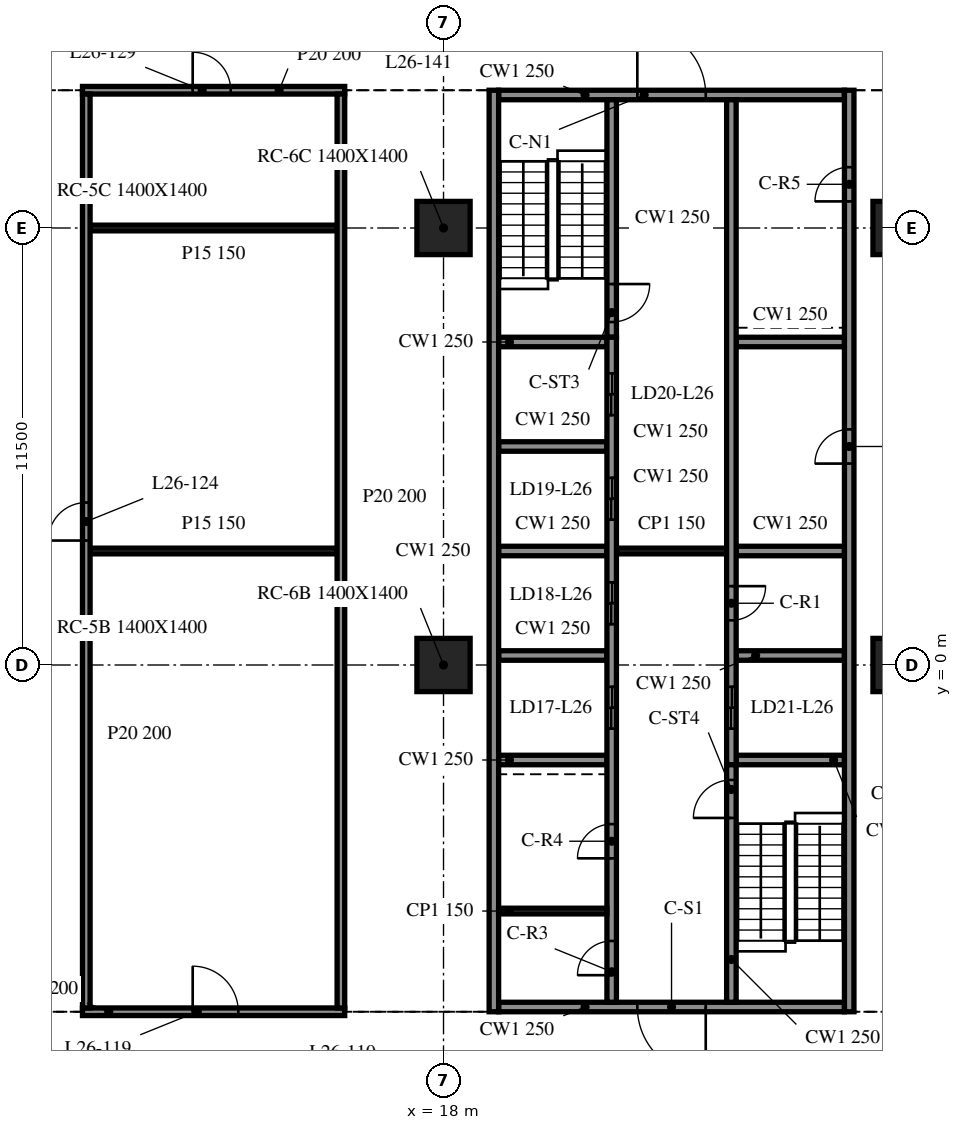
"""IFC4 building model, lengths in metres.
Left out: names, types, materials, properties, quantities, classifications, styles, units other than length and angle.
Written with IfcOpenShell. Run it as: python <this file> out.ifc"""

import sys

from ifc_helpers import new_model, si_unit, direction, frame, frame_2d, origin, origin_2d, place, context, subcontext, project, spatial, rectangle, extrude, element, fill, save


model = new_model("IFC4")
c1 = context("Model", 3, precision=1e-05, world=origin(), true_north=direction((0.0, 1.0)))
c2 = subcontext(c1, "Body", "Model", "MODEL_VIEW")
j1 = project(units=[si_unit("LENGTHUNIT", "METRE"), si_unit("PLANEANGLEUNIT", "RADIAN")], contexts=[c1])
p1 = place(None, origin())
s1 = spatial("IfcSite", under=j1, at=p1, CompositionType="ELEMENT")
p2 = place(p1, origin())
s2 = spatial("IfcBuilding", under=s1, at=p2, CompositionType="ELEMENT")
p3 = place(p2, frame((0.0, 0.0, 113.5)))
s3 = spatial("IfcBuildingStorey", under=s2, at=p3, CompositionType="ELEMENT", Elevation=113.5)
for number, where, z_axis, x_axis in (
    (1, (18.0, 0.0, -0.34), (0.0, 0.0, 1.0), (1.0, 0.0, 0.0)),
    (2, (18.0, 11.5, -0.34), (0.0, 0.0, 1.0), (1.0, 0.0, 0.0)),
    (3, (30.0, 0.0, -0.34), (0.0, 0.0, 1.0), (1.0, 0.0, 0.0)),
    (4, (30.0, 11.5, -0.34), (0.0, 0.0, 1.0), (1.0, 0.0, 0.0)),
):
    element("IfcColumn", number, at=place(p3, frame(where, z_axis=z_axis, x_axis=x_axis)), inside=s3, PredefinedType="COLUMN", context=c2, shape_type="SweptSolid", body=[
        extrude(rectangle(XDim=1.4, YDim=1.4, at=origin_2d()), origin(), (0.0, 0.0, 1.0), 3.89),
    ])
p4 = place(p3, frame((19.325, 15.125, 0.0), z_axis=(0.0, 0.0, 1.0), x_axis=(0.0, -1.0, 0.0)))
e5 = element("IfcWall", 5, at=p4, inside=s3, PredefinedType="SOLIDWALL", context=c2, shape_type="SweptSolid", body=[
    extrude(rectangle(XDim=24.25, YDim=0.25, at=frame_2d((12.125, 0.0))), origin(), (0.0, 0.0, 1.0), 3.55),
])
p5 = place(p3, frame((28.675, -9.125, 0.0), z_axis=(0.0, 0.0, 1.0), x_axis=(0.0, 1.0, 0.0)))
e6 = element("IfcWall", 6, at=p5, inside=s3, PredefinedType="SOLIDWALL", context=c2, shape_type="SweptSolid", body=[
    extrude(rectangle(XDim=24.25, YDim=0.25, at=frame_2d((12.125, 0.0))), origin(), (0.0, 0.0, 1.0), 3.55),
])
p6 = place(p5, frame((14.425, 0.0, 0.0)))
e7 = element("IfcOpeningElement", 7, at=p6, cuts=e6, PredefinedType="OPENING", context=c2, shape_type="SweptSolid", body=[
    extrude(rectangle(XDim=0.9, YDim=2.1, at=frame_2d((0.45, 1.05))), frame((0.0, 0.135, 0.0), z_axis=(0.0, -1.0, 0.0), x_axis=(1.0, 0.0, 0.0)), (0.0, 0.0, 1.0), 0.27),
])
p7 = place(p5, frame((21.325, 0.0, 0.0)))
e8 = element("IfcOpeningElement", 8, at=p7, cuts=e6, PredefinedType="OPENING", context=c2, shape_type="SweptSolid", body=[
    extrude(rectangle(XDim=0.9, YDim=2.1, at=frame_2d((0.45, 1.05))), frame((0.0, 0.135, 0.0), z_axis=(0.0, -1.0, 0.0), x_axis=(1.0, 0.0, 0.0)), (0.0, 0.0, 1.0), 0.27),
])
p8 = place(p3, frame((28.55, -9.0, 0.0), z_axis=(0.0, 0.0, 1.0), x_axis=(-1.0, 0.0, 0.0)))
e9 = element("IfcWall", 9, at=p8, inside=s3, PredefinedType="SOLIDWALL", context=c2, shape_type="SweptSolid", body=[
    extrude(rectangle(XDim=9.1, YDim=0.25, at=frame_2d((4.55, 0.0))), origin(), (0.0, 0.0, 1.0), 3.55),
])
p9 = place(p8, frame((3.65, 0.0, 0.0)))
e10 = element("IfcOpeningElement", 10, at=p9, cuts=e9, PredefinedType="OPENING", context=c2, shape_type="SweptSolid", body=[
    extrude(rectangle(XDim=1.8, YDim=2.1, at=frame_2d((0.9, 1.05))), frame((0.0, 0.135, 0.0), z_axis=(0.0, -1.0, 0.0), x_axis=(1.0, 0.0, 0.0)), (0.0, 0.0, 1.0), 0.27),
])
p10 = place(p3, frame((19.45, 15.0, 0.0), z_axis=(0.0, 0.0, 1.0), x_axis=(1.0, 0.0, 0.0)))
e11 = element("IfcWall", 11, at=p10, inside=s3, PredefinedType="SOLIDWALL", context=c2, shape_type="SweptSolid", body=[
    extrude(rectangle(XDim=9.1, YDim=0.25, at=frame_2d((4.55, 0.0))), origin(), (0.0, 0.0, 1.0), 3.55),
])
p11 = place(p10, frame((3.65, 0.0, 0.0)))
e12 = element("IfcOpeningElement", 12, at=p11, cuts=e11, PredefinedType="OPENING", context=c2, shape_type="SweptSolid", body=[
    extrude(rectangle(XDim=1.8, YDim=2.1, at=frame_2d((0.9, 1.05))), frame((0.0, 0.135, 0.0), z_axis=(0.0, -1.0, 0.0), x_axis=(1.0, 0.0, 0.0)), (0.0, 0.0, 1.0), 0.27),
])
p12 = place(p3, frame((22.425, -8.875, 0.0), z_axis=(0.0, 0.0, 1.0), x_axis=(0.0, 1.0, 0.0)))
e13 = element("IfcWall", 13, at=p12, inside=s3, PredefinedType="SOLIDWALL", context=c2, shape_type="SweptSolid", body=[
    extrude(rectangle(XDim=17.5, YDim=0.25, at=frame_2d((8.75, 0.0))), origin(), (0.0, 0.0, 1.0), 3.55),
])
p13 = place(p12, frame((7.2, 0.0, 0.0)))
e14 = element("IfcOpeningElement", 14, at=p13, cuts=e13, PredefinedType="OPENING", context=c2, shape_type="SweptSolid", body=[
    extrude(rectangle(XDim=1.1, YDim=2.1, at=frame_2d((0.55, 1.05))), frame((0.0, 0.135, 0.0), z_axis=(0.0, -1.0, 0.0), x_axis=(1.0, 0.0, 0.0)), (0.0, 0.0, 1.0), 0.27),
])
p14 = place(p12, frame((9.95, 0.0, 0.0)))
e15 = element("IfcOpeningElement", 15, at=p14, cuts=e13, PredefinedType="OPENING", context=c2, shape_type="SweptSolid", body=[
    extrude(rectangle(XDim=1.1, YDim=2.1, at=frame_2d((0.55, 1.05))), frame((0.0, 0.135, 0.0), z_axis=(0.0, -1.0, 0.0), x_axis=(1.0, 0.0, 0.0)), (0.0, 0.0, 1.0), 0.27),
])
p15 = place(p12, frame((12.7, 0.0, 0.0)))
e16 = element("IfcOpeningElement", 16, at=p15, cuts=e13, PredefinedType="OPENING", context=c2, shape_type="SweptSolid", body=[
    extrude(rectangle(XDim=1.1, YDim=2.1, at=frame_2d((0.55, 1.05))), frame((0.0, 0.135, 0.0), z_axis=(0.0, -1.0, 0.0), x_axis=(1.0, 0.0, 0.0)), (0.0, 0.0, 1.0), 0.27),
])
p16 = place(p12, frame((15.45, 0.0, 0.0)))
e17 = element("IfcOpeningElement", 17, at=p16, cuts=e13, PredefinedType="OPENING", context=c2, shape_type="SweptSolid", body=[
    extrude(rectangle(XDim=1.1, YDim=2.1, at=frame_2d((0.55, 1.05))), frame((0.0, 0.135, 0.0), z_axis=(0.0, -1.0, 0.0), x_axis=(1.0, 0.0, 0.0)), (0.0, 0.0, 1.0), 0.27),
])
p17 = place(p12, frame((0.712, 0.0, 0.0)))
e18 = element("IfcOpeningElement", 18, at=p17, cuts=e13, PredefinedType="OPENING", context=c2, shape_type="SweptSolid", body=[
    extrude(rectangle(XDim=0.9, YDim=2.1, at=frame_2d((0.45, 1.05))), frame((0.0, 0.135, 0.0), z_axis=(0.0, -1.0, 0.0), x_axis=(1.0, 0.0, 0.0)), (0.0, 0.0, 1.0), 0.27),
])
p18 = place(p12, frame((3.788, 0.0, 0.0)))
e19 = element("IfcOpeningElement", 19, at=p18, cuts=e13, PredefinedType="OPENING", context=c2, shape_type="SweptSolid", body=[
    extrude(rectangle(XDim=0.9, YDim=2.1, at=frame_2d((0.45, 1.05))), frame((0.0, 0.135, 0.0), z_axis=(0.0, -1.0, 0.0), x_axis=(1.0, 0.0, 0.0)), (0.0, 0.0, 1.0), 0.27),
])
p19 = place(p3, frame((22.425, 14.875, 0.0), z_axis=(0.0, 0.0, 1.0), x_axis=(0.0, -1.0, 0.0)))
e20 = element("IfcWall", 20, at=p19, inside=s3, PredefinedType="SOLIDWALL", context=c2, shape_type="SweptSolid", body=[
    extrude(rectangle(XDim=6.25, YDim=0.25, at=frame_2d((3.125, 0.0))), origin(), (0.0, 0.0, 1.0), 3.55),
])
p20 = place(p19, frame((4.85, 0.0, 0.0)))
e21 = element("IfcOpeningElement", 21, at=p20, cuts=e20, PredefinedType="OPENING", context=c2, shape_type="SweptSolid", body=[
    extrude(rectangle(XDim=1.0, YDim=2.1, at=frame_2d((0.5, 1.05))), frame((0.0, 0.135, 0.0), z_axis=(0.0, -1.0, 0.0), x_axis=(1.0, 0.0, 0.0)), (0.0, 0.0, 1.0), 0.27),
])
p21 = place(p3, frame((25.575, -8.875, 0.0), z_axis=(0.0, 0.0, 1.0), x_axis=(0.0, 1.0, 0.0)))
e22 = element("IfcWall", 22, at=p21, inside=s3, PredefinedType="SOLIDWALL", context=c2, shape_type="SweptSolid", body=[
    extrude(rectangle(XDim=6.25, YDim=0.25, at=frame_2d((3.125, 0.0))), origin(), (0.0, 0.0, 1.0), 3.55),
])
p22 = place(p21, frame((4.85, 0.0, 0.0)))
e23 = element("IfcOpeningElement", 23, at=p22, cuts=e22, PredefinedType="OPENING", context=c2, shape_type="SweptSolid", body=[
    extrude(rectangle(XDim=1.0, YDim=2.1, at=frame_2d((0.5, 1.05))), frame((0.0, 0.135, 0.0), z_axis=(0.0, -1.0, 0.0), x_axis=(1.0, 0.0, 0.0)), (0.0, 0.0, 1.0), 0.27),
])
p23 = place(p3, frame((25.575, 14.875, 0.0), z_axis=(0.0, 0.0, 1.0), x_axis=(0.0, -1.0, 0.0)))
e24 = element("IfcWall", 24, at=p23, inside=s3, PredefinedType="SOLIDWALL", context=c2, shape_type="SweptSolid", body=[
    extrude(rectangle(XDim=17.5, YDim=0.25, at=frame_2d((8.75, 0.0))), origin(), (0.0, 0.0, 1.0), 3.55),
])
p24 = place(p23, frame((15.45, 0.0, 0.0)))
e25 = element("IfcOpeningElement", 25, at=p24, cuts=e24, PredefinedType="OPENING", context=c2, shape_type="SweptSolid", body=[
    extrude(rectangle(XDim=1.1, YDim=2.1, at=frame_2d((0.55, 1.05))), frame((0.0, 0.135, 0.0), z_axis=(0.0, -1.0, 0.0), x_axis=(1.0, 0.0, 0.0)), (0.0, 0.0, 1.0), 0.27),
])
p25 = place(p23, frame((12.8, 0.0, 0.0)))
e26 = element("IfcOpeningElement", 26, at=p25, cuts=e24, PredefinedType="OPENING", context=c2, shape_type="SweptSolid", body=[
    extrude(rectangle(XDim=0.9, YDim=2.1, at=frame_2d((0.45, 1.05))), frame((0.0, 0.135, 0.0), z_axis=(0.0, -1.0, 0.0), x_axis=(1.0, 0.0, 0.0)), (0.0, 0.0, 1.0), 0.27),
])
for number, where, z_axis, x_axis in (
    (27, (19.45, -2.5, 0.0), (0.0, 0.0, 1.0), (1.0, 0.0, 0.0)),
    (28, (19.45, 0.25, 0.0), (0.0, 0.0, 1.0), (1.0, 0.0, 0.0)),
    (29, (19.45, 3.0, 0.0), (0.0, 0.0, 1.0), (1.0, 0.0, 0.0)),
    (30, (19.45, 5.75, 0.0), (0.0, 0.0, 1.0), (1.0, 0.0, 0.0)),
    (31, (19.45, 8.5, 0.0), (0.0, 0.0, 1.0), (1.0, 0.0, 0.0)),
    (32, (25.7, -2.5, 0.0), (0.0, 0.0, 1.0), (1.0, 0.0, 0.0)),
    (33, (25.7, 0.25, 0.0), (0.0, 0.0, 1.0), (1.0, 0.0, 0.0)),
    (34, (25.7, 3.0, 0.0), (0.0, 0.0, 1.0), (1.0, 0.0, 0.0)),
    (35, (25.7, 8.5, 0.0), (0.0, 0.0, 1.0), (1.0, 0.0, 0.0)),
):
    element("IfcWall", number, at=place(p3, frame(where, z_axis=z_axis, x_axis=x_axis)), inside=s3, PredefinedType="SOLIDWALL", context=c2, shape_type="SweptSolid", body=[
        extrude(rectangle(XDim=2.85, YDim=0.25, at=frame_2d((1.425, 0.0))), origin(), (0.0, 0.0, 1.0), 3.55),
    ])
p26 = place(p3, frame((22.55, 3.0, 0.0), z_axis=(0.0, 0.0, 1.0), x_axis=(1.0, 0.0, 0.0)))
e36 = element("IfcWall", 36, at=p26, inside=s3, PredefinedType="PARTITIONING", context=c2, shape_type="SweptSolid", body=[
    extrude(rectangle(XDim=2.9, YDim=0.15, at=frame_2d((1.45, 0.0))), origin(), (0.0, 0.0, 1.0), 3.55),
])
p27 = place(p3, frame((19.45, -6.475, 0.0), z_axis=(0.0, 0.0, 1.0), x_axis=(1.0, 0.0, 0.0)))
e37 = element("IfcWall", 37, at=p27, inside=s3, PredefinedType="PARTITIONING", context=c2, shape_type="SweptSolid", body=[
    extrude(rectangle(XDim=2.85, YDim=0.15, at=frame_2d((1.425, 0.0))), origin(), (0.0, 0.0, 1.0), 3.55),
])
p28 = place(p3, frame((8.5, -9.125, 0.0), z_axis=(0.0, 0.0, 1.0), x_axis=(1.0, 0.0, 0.0)))
e38 = element("IfcWall", 38, at=p28, inside=s3, PredefinedType="PARTITIONING", context=c2, shape_type="SweptSolid", body=[
    extrude(rectangle(XDim=6.9, YDim=0.2, at=frame_2d((3.45, 0.0))), origin(), (0.0, 0.0, 1.0), 3.55),
])
p29 = place(p28, frame((2.9, 0.0, 0.0)))
e39 = element("IfcOpeningElement", 39, at=p29, cuts=e38, PredefinedType="OPENING", context=c2, shape_type="SweptSolid", body=[
    extrude(rectangle(XDim=1.2, YDim=2.1, at=frame_2d((0.6, 1.05))), frame((0.0, 0.11, 0.0), z_axis=(0.0, -1.0, 0.0), x_axis=(1.0, 0.0, 0.0)), (0.0, 0.0, 1.0), 0.22),
])
for number, where, z_axis, x_axis in (
    (40, (8.7, 3.0, 0.0), (0.0, 0.0, 1.0), (1.0, 0.0, 0.0)),
    (41, (8.7, 11.5, 0.0), (0.0, 0.0, 1.0), (1.0, 0.0, 0.0)),
):
    element("IfcWall", number, at=place(p3, frame(where, z_axis=z_axis, x_axis=x_axis)), inside=s3, PredefinedType="PARTITIONING", context=c2, shape_type="SweptSolid", body=[
        extrude(rectangle(XDim=6.5, YDim=0.15, at=frame_2d((3.25, 0.0))), origin(), (0.0, 0.0, 1.0), 3.55),
    ])
p30 = place(p3, frame((8.5, 15.125, 0.0), z_axis=(0.0, 0.0, 1.0), x_axis=(1.0, 0.0, 0.0)))
e42 = element("IfcWall", 42, at=p30, inside=s3, PredefinedType="PARTITIONING", context=c2, shape_type="SweptSolid", body=[
    extrude(rectangle(XDim=6.9, YDim=0.2, at=frame_2d((3.45, 0.0))), origin(), (0.0, 0.0, 1.0), 3.55),
])
p31 = place(p30, frame((2.9, 0.0, 0.0)))
e43 = element("IfcOpeningElement", 43, at=p31, cuts=e42, PredefinedType="OPENING", context=c2, shape_type="SweptSolid", body=[
    extrude(rectangle(XDim=1.0, YDim=2.1, at=frame_2d((0.5, 1.05))), frame((0.0, 0.11, 0.0), z_axis=(0.0, -1.0, 0.0), x_axis=(1.0, 0.0, 0.0)), (0.0, 0.0, 1.0), 0.22),
])
p32 = place(p3, frame((8.6, -9.025, 0.0), z_axis=(0.0, 0.0, 1.0), x_axis=(0.0, 1.0, 0.0)))
e44 = element("IfcWall", 44, at=p32, inside=s3, PredefinedType="PARTITIONING", context=c2, shape_type="SweptSolid", body=[
    extrude(rectangle(XDim=24.05, YDim=0.2, at=frame_2d((12.025, 0.0))), origin(), (0.0, 0.0, 1.0), 3.55),
])
p33 = place(p32, frame((12.3, 0.0, 0.0)))
e45 = element("IfcOpeningElement", 45, at=p33, cuts=e44, PredefinedType="OPENING", context=c2, shape_type="SweptSolid", body=[
    extrude(rectangle(XDim=1.0, YDim=2.1, at=frame_2d((0.5, 1.05))), frame((0.0, 0.11, 0.0), z_axis=(0.0, -1.0, 0.0), x_axis=(1.0, 0.0, 0.0)), (0.0, 0.0, 1.0), 0.22),
])
p34 = place(p3, frame((15.3, -9.025, 0.0), z_axis=(0.0, 0.0, 1.0), x_axis=(0.0, 1.0, 0.0)))
e46 = element("IfcWall", 46, at=p34, inside=s3, PredefinedType="PARTITIONING", context=c2, shape_type="SweptSolid", body=[
    extrude(rectangle(XDim=24.05, YDim=0.2, at=frame_2d((12.025, 0.0))), origin(), (0.0, 0.0, 1.0), 3.55),
])
p35 = place(p9, origin())
e47 = element("IfcDoor", 47, at=p35, inside=s3, OperationType="DOUBLE_DOOR_SINGLE_SWING", PredefinedType="DOOR", context=c2, shape_type="SweptSolid", body=[
    extrude(rectangle(XDim=1.8, YDim=2.1, at=frame_2d((0.9, 1.05))), frame((0.0, 0.025, 0.0), z_axis=(0.0, -1.0, 0.0), x_axis=(1.0, 0.0, 0.0)), (0.0, 0.0, 1.0), 0.05),
])
fill(e10, e47)
p36 = place(p11, origin())
e48 = element("IfcDoor", 48, at=p36, inside=s3, OperationType="DOUBLE_DOOR_SINGLE_SWING", PredefinedType="DOOR", context=c2, shape_type="SweptSolid", body=[
    extrude(rectangle(XDim=1.8, YDim=2.1, at=frame_2d((0.9, 1.05))), frame((0.0, 0.025, 0.0), z_axis=(0.0, -1.0, 0.0), x_axis=(1.0, 0.0, 0.0)), (0.0, 0.0, 1.0), 0.05),
])
fill(e12, e48)
p37 = place(p24, origin())
e49 = element("IfcDoor", 49, at=p37, inside=s3, OperationType="DOUBLE_DOOR_SLIDING", PredefinedType="DOOR", context=c2, shape_type="SweptSolid", body=[
    extrude(rectangle(XDim=1.1, YDim=2.1, at=frame_2d((0.55, 1.05))), frame((0.0, 0.025, 0.0), z_axis=(0.0, -1.0, 0.0), x_axis=(1.0, 0.0, 0.0)), (0.0, 0.0, 1.0), 0.05),
])
fill(e25, e49)
p38 = place(p13, origin())
e50 = element("IfcDoor", 50, at=p38, inside=s3, OperationType="DOUBLE_DOOR_SLIDING", PredefinedType="DOOR", context=c2, shape_type="SweptSolid", body=[
    extrude(rectangle(XDim=1.1, YDim=2.1, at=frame_2d((0.55, 1.05))), frame((0.0, 0.025, 0.0), z_axis=(0.0, -1.0, 0.0), x_axis=(1.0, 0.0, 0.0)), (0.0, 0.0, 1.0), 0.05),
])
fill(e14, e50)
p39 = place(p14, origin())
e51 = element("IfcDoor", 51, at=p39, inside=s3, OperationType="DOUBLE_DOOR_SLIDING", PredefinedType="DOOR", context=c2, shape_type="SweptSolid", body=[
    extrude(rectangle(XDim=1.1, YDim=2.1, at=frame_2d((0.55, 1.05))), frame((0.0, 0.025, 0.0), z_axis=(0.0, -1.0, 0.0), x_axis=(1.0, 0.0, 0.0)), (0.0, 0.0, 1.0), 0.05),
])
fill(e15, e51)
p40 = place(p15, origin())
e52 = element("IfcDoor", 52, at=p40, inside=s3, OperationType="DOUBLE_DOOR_SLIDING", PredefinedType="DOOR", context=c2, shape_type="SweptSolid", body=[
    extrude(rectangle(XDim=1.1, YDim=2.1, at=frame_2d((0.55, 1.05))), frame((0.0, 0.025, 0.0), z_axis=(0.0, -1.0, 0.0), x_axis=(1.0, 0.0, 0.0)), (0.0, 0.0, 1.0), 0.05),
])
fill(e16, e52)
p41 = place(p16, origin())
e53 = element("IfcDoor", 53, at=p41, inside=s3, OperationType="DOUBLE_DOOR_SLIDING", PredefinedType="DOOR", context=c2, shape_type="SweptSolid", body=[
    extrude(rectangle(XDim=1.1, YDim=2.1, at=frame_2d((0.55, 1.05))), frame((0.0, 0.025, 0.0), z_axis=(0.0, -1.0, 0.0), x_axis=(1.0, 0.0, 0.0)), (0.0, 0.0, 1.0), 0.05),
])
fill(e17, e53)
p42 = place(p25, origin())
e54 = element("IfcDoor", 54, at=p42, inside=s3, OperationType="SINGLE_SWING_LEFT", PredefinedType="DOOR", context=c2, shape_type="SweptSolid", body=[
    extrude(rectangle(XDim=0.9, YDim=2.1, at=frame_2d((0.45, 1.05))), frame((0.0, 0.025, 0.0), z_axis=(0.0, -1.0, 0.0), x_axis=(1.0, 0.0, 0.0)), (0.0, 0.0, 1.0), 0.05),
])
fill(e26, e54)
p43 = place(p6, origin())
e55 = element("IfcDoor", 55, at=p43, inside=s3, OperationType="SINGLE_SWING_RIGHT", PredefinedType="DOOR", context=c2, shape_type="SweptSolid", body=[
    extrude(rectangle(XDim=0.9, YDim=2.1, at=frame_2d((0.45, 1.05))), frame((0.0, 0.025, 0.0), z_axis=(0.0, -1.0, 0.0), x_axis=(1.0, 0.0, 0.0)), (0.0, 0.0, 1.0), 0.05),
])
fill(e7, e55)
p44 = place(p17, origin())
e56 = element("IfcDoor", 56, at=p44, inside=s3, OperationType="SINGLE_SWING_LEFT", PredefinedType="DOOR", context=c2, shape_type="SweptSolid", body=[
    extrude(rectangle(XDim=0.9, YDim=2.1, at=frame_2d((0.45, 1.05))), frame((0.0, 0.025, 0.0), z_axis=(0.0, -1.0, 0.0), x_axis=(1.0, 0.0, 0.0)), (0.0, 0.0, 1.0), 0.05),
])
fill(e18, e56)
p45 = place(p18, origin())
e57 = element("IfcDoor", 57, at=p45, inside=s3, OperationType="SINGLE_SWING_RIGHT", PredefinedType="DOOR", context=c2, shape_type="SweptSolid", body=[
    extrude(rectangle(XDim=0.9, YDim=2.1, at=frame_2d((0.45, 1.05))), frame((0.0, 0.025, 0.0), z_axis=(0.0, -1.0, 0.0), x_axis=(1.0, 0.0, 0.0)), (0.0, 0.0, 1.0), 0.05),
])
fill(e19, e57)
p46 = place(p7, origin())
e58 = element("IfcDoor", 58, at=p46, inside=s3, OperationType="SINGLE_SWING_LEFT", PredefinedType="DOOR", context=c2, shape_type="SweptSolid", body=[
    extrude(rectangle(XDim=0.9, YDim=2.1, at=frame_2d((0.45, 1.05))), frame((0.0, 0.025, 0.0), z_axis=(0.0, -1.0, 0.0), x_axis=(1.0, 0.0, 0.0)), (0.0, 0.0, 1.0), 0.05),
])
fill(e8, e58)
p47 = place(p20, origin())
e59 = element("IfcDoor", 59, at=p47, inside=s3, OperationType="SINGLE_SWING_RIGHT", PredefinedType="DOOR", context=c2, shape_type="SweptSolid", body=[
    extrude(rectangle(XDim=1.0, YDim=2.1, at=frame_2d((0.5, 1.05))), frame((0.0, 0.025, 0.0), z_axis=(0.0, -1.0, 0.0), x_axis=(1.0, 0.0, 0.0)), (0.0, 0.0, 1.0), 0.05),
])
fill(e21, e59)
p48 = place(p22, origin())
e60 = element("IfcDoor", 60, at=p48, inside=s3, OperationType="SINGLE_SWING_LEFT", PredefinedType="DOOR", context=c2, shape_type="SweptSolid", body=[
    extrude(rectangle(XDim=1.0, YDim=2.1, at=frame_2d((0.5, 1.05))), frame((0.0, 0.025, 0.0), z_axis=(0.0, -1.0, 0.0), x_axis=(1.0, 0.0, 0.0)), (0.0, 0.0, 1.0), 0.05),
])
fill(e23, e60)
p49 = place(p29, origin())
e61 = element("IfcDoor", 61, at=p49, inside=s3, OperationType="SINGLE_SWING_RIGHT", PredefinedType="DOOR", context=c2, shape_type="SweptSolid", body=[
    extrude(rectangle(XDim=1.2, YDim=2.1, at=frame_2d((0.6, 1.05))), frame((0.0, 0.025, 0.0), z_axis=(0.0, -1.0, 0.0), x_axis=(1.0, 0.0, 0.0)), (0.0, 0.0, 1.0), 0.05),
])
fill(e39, e61)
p50 = place(p33, origin())
e62 = element("IfcDoor", 62, at=p50, inside=s3, OperationType="SINGLE_SWING_LEFT", PredefinedType="DOOR", context=c2, shape_type="SweptSolid", body=[
    extrude(rectangle(XDim=1.0, YDim=2.1, at=frame_2d((0.5, 1.05))), frame((0.0, 0.025, 0.0), z_axis=(0.0, -1.0, 0.0), x_axis=(1.0, 0.0, 0.0)), (0.0, 0.0, 1.0), 0.05),
])
fill(e45, e62)
p51 = place(p31, origin())
e63 = element("IfcDoor", 63, at=p51, inside=s3, OperationType="SINGLE_SWING_RIGHT", PredefinedType="DOOR", context=c2, shape_type="SweptSolid", body=[
    extrude(rectangle(XDim=1.0, YDim=2.1, at=frame_2d((0.5, 1.05))), frame((0.0, 0.025, 0.0), z_axis=(0.0, -1.0, 0.0), x_axis=(1.0, 0.0, 0.0)), (0.0, 0.0, 1.0), 0.05),
])
fill(e43, e63)
save(model, sys.argv[1])
